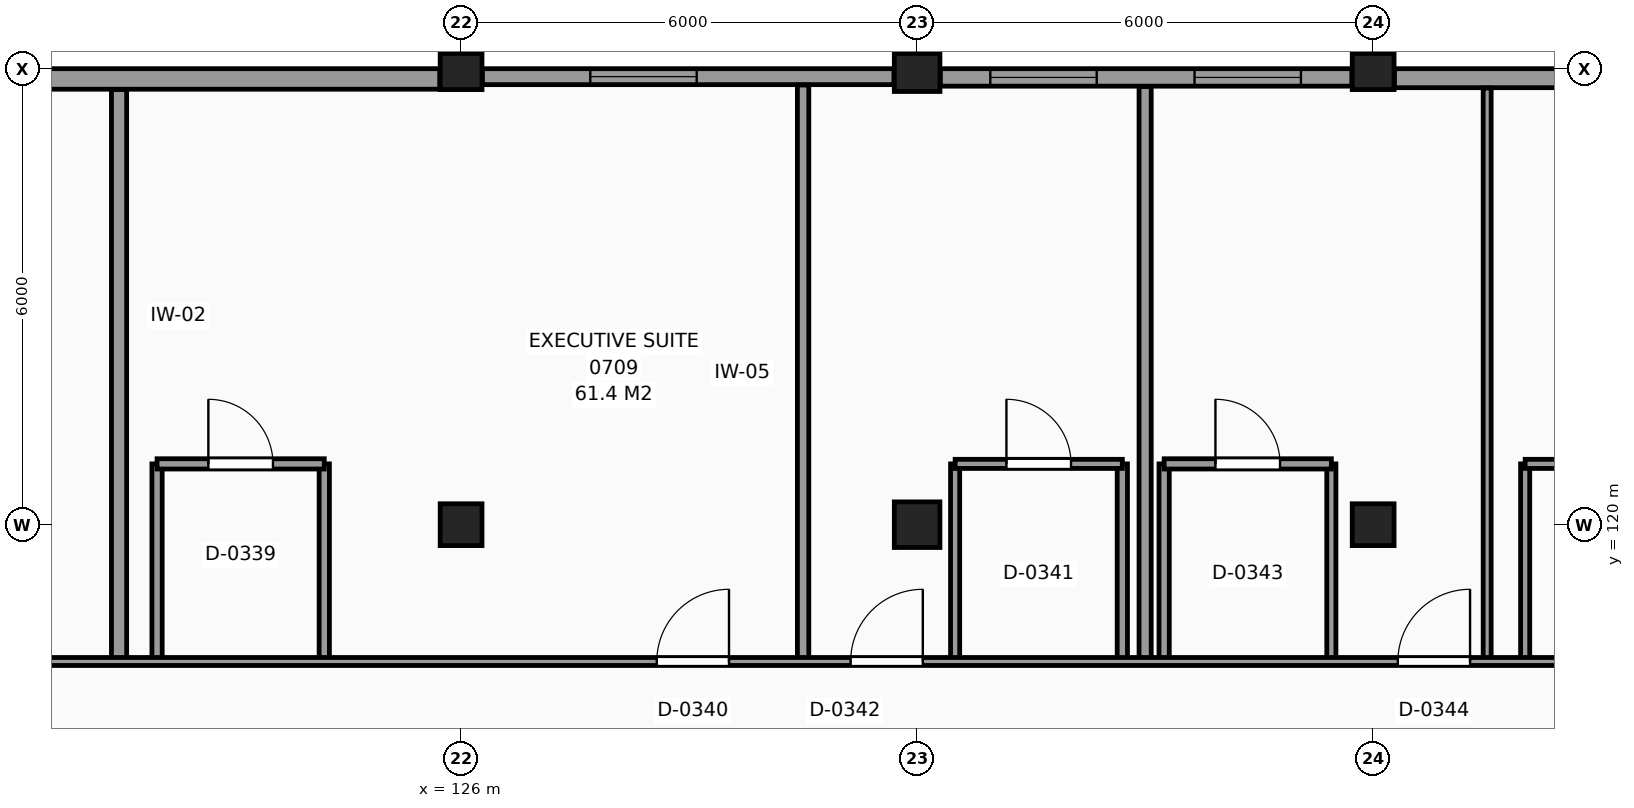
"""IFC4 building model, lengths in metres.
Left out: names, types, materials, properties, quantities, classifications, styles, units other than length and angle.
Written with IfcOpenShell. Run it as: python <this file> out.ifc"""

import sys

from ifc_helpers import new_model, si_unit, direction, frame, frame_2d, origin, origin_2d, place, context, subcontext, project, spatial, rectangle, extrude, element, fill, save


model = new_model("IFC4")
c1 = context("Model", 3, precision=1e-05, world=origin(), true_north=direction((0.0, 1.0)))
c2 = subcontext(c1, "Body", "Model", "MODEL_VIEW")
j1 = project(units=[si_unit("LENGTHUNIT", "METRE"), si_unit("PLANEANGLEUNIT", "RADIAN")], contexts=[c1])
p1 = place(None, origin())
s1 = spatial("IfcSite", under=j1, at=p1, CompositionType="ELEMENT")
p2 = place(p1, origin())
s2 = spatial("IfcBuilding", under=s1, at=p2, CompositionType="ELEMENT")
p3 = place(p2, frame((0.0, 0.0, 31.5)))
s3 = spatial("IfcBuildingStorey", under=s2, at=p3, CompositionType="ELEMENT", Elevation=31.5)
for number, where, z_axis, x_axis in (
    (1, (126.0, 120.0, 0.0), (0.0, 0.0, 1.0), (1.0, 0.0, 0.0)),
    (2, (126.0, 126.0, 0.0), (0.0, 0.0, 1.0), (1.0, 0.0, 0.0)),
):
    element("IfcColumn", number, at=place(p3, frame(where, z_axis=z_axis, x_axis=x_axis)), inside=s3, PredefinedType="COLUMN", context=c2, shape_type="SweptSolid", body=[
        extrude(rectangle(XDim=0.55, YDim=0.55, at=origin_2d()), origin(), (0.0, 0.0, 1.0), 3.3),
    ])
for number, where, z_axis, x_axis in (
    (3, (132.0, 120.0, 0.0), (0.0, 0.0, 1.0), (1.0, 0.0, 0.0)),
    (4, (132.0, 126.0, 0.0), (0.0, 0.0, 1.0), (1.0, 0.0, 0.0)),
):
    element("IfcColumn", number, at=place(p3, frame(where, z_axis=z_axis, x_axis=x_axis)), inside=s3, PredefinedType="COLUMN", context=c2, shape_type="SweptSolid", body=[
        extrude(rectangle(XDim=0.6, YDim=0.6, at=origin_2d()), origin(), (0.0, 0.0, 1.0), 3.3),
    ])
for number, where, z_axis, x_axis in (
    (5, (138.0, 120.0, 0.0), (0.0, 0.0, 1.0), (1.0, 0.0, 0.0)),
    (6, (138.0, 126.0, 0.0), (0.0, 0.0, 1.0), (1.0, 0.0, 0.0)),
):
    element("IfcColumn", number, at=place(p3, frame(where, z_axis=z_axis, x_axis=x_axis)), inside=s3, PredefinedType="COLUMN", context=c2, shape_type="SweptSolid", body=[
        extrude(rectangle(XDim=0.55, YDim=0.55, at=origin_2d()), origin(), (0.0, 0.0, 1.0), 3.3),
    ])
p4 = place(p3, frame((143.695, 125.875, 0.0), z_axis=(0.0, 0.0, 1.0), x_axis=(-1.0, 0.0, 0.0)))
e7 = element("IfcWall", 7, at=p4, inside=s3, PredefinedType="SOLIDWALL", context=c2, shape_type="SweptSolid", body=[
    extrude(rectangle(XDim=5.415, YDim=0.25, at=frame_2d((2.708, 0.0))), origin(), (0.0, 0.0, 1.0), 2.42),
])
p5 = place(p4, frame((1.408, 0.0, 0.8)))
e8 = element("IfcOpeningElement", 8, at=p5, cuts=e7, PredefinedType="OPENING", context=c2, shape_type="SweptSolid", body=[
    extrude(rectangle(XDim=1.4, YDim=1.4, at=frame_2d((0.7, 0.7))), frame((0.0, 0.135, 0.0), z_axis=(0.0, -1.0, 0.0), x_axis=(1.0, 0.0, 0.0)), (0.0, 0.0, 1.0), 0.27),
])
p6 = place(p3, frame((137.72, 125.885, 0.0), z_axis=(0.0, 0.0, 1.0), x_axis=(-1.0, 0.0, 0.0)))
e9 = element("IfcWall", 9, at=p6, inside=s3, PredefinedType="SOLIDWALL", context=c2, shape_type="SweptSolid", body=[
    extrude(rectangle(XDim=5.415, YDim=0.23, at=frame_2d((2.708, 0.0))), origin(), (0.0, 0.0, 1.0), 2.42),
])
p7 = place(p6, frame((3.357, 0.0, 0.8)))
e10 = element("IfcOpeningElement", 10, at=p7, cuts=e9, PredefinedType="OPENING", context=c2, shape_type="SweptSolid", body=[
    extrude(rectangle(XDim=1.4, YDim=1.4, at=frame_2d((0.7, 0.7))), frame((0.0, 0.125, 0.0), z_axis=(0.0, -1.0, 0.0), x_axis=(1.0, 0.0, 0.0)), (0.0, 0.0, 1.0), 0.25),
])
p8 = place(p6, frame((0.67, 0.0, 0.8)))
e11 = element("IfcOpeningElement", 11, at=p8, cuts=e9, PredefinedType="OPENING", context=c2, shape_type="SweptSolid", body=[
    extrude(rectangle(XDim=1.4, YDim=1.4, at=frame_2d((0.7, 0.7))), frame((0.0, 0.125, 0.0), z_axis=(0.0, -1.0, 0.0), x_axis=(1.0, 0.0, 0.0)), (0.0, 0.0, 1.0), 0.25),
])
p9 = place(p3, frame((131.695, 125.895, 0.0), z_axis=(0.0, 0.0, 1.0), x_axis=(-1.0, 0.0, 0.0)))
e12 = element("IfcWall", 12, at=p9, inside=s3, PredefinedType="SOLIDWALL", context=c2, shape_type="SweptSolid", body=[
    extrude(rectangle(XDim=5.415, YDim=0.21, at=frame_2d((2.708, 0.0))), origin(), (0.0, 0.0, 1.0), 2.42),
])
p10 = place(p9, frame((2.595, 0.0, 0.8)))
e13 = element("IfcOpeningElement", 13, at=p10, cuts=e12, PredefinedType="OPENING", context=c2, shape_type="SweptSolid", body=[
    extrude(rectangle(XDim=1.4, YDim=1.4, at=frame_2d((0.7, 0.7))), frame((0.0, 0.115, 0.0), z_axis=(0.0, -1.0, 0.0), x_axis=(1.0, 0.0, 0.0)), (0.0, 0.0, 1.0), 0.23),
])
p11 = place(p3, frame((125.72, 125.865, 0.0), z_axis=(0.0, 0.0, 1.0), x_axis=(-1.0, 0.0, 0.0)))
e14 = element("IfcWall", 14, at=p11, inside=s3, PredefinedType="SOLIDWALL", context=c2, shape_type="SweptSolid", body=[
    extrude(rectangle(XDim=5.415, YDim=0.27, at=frame_2d((2.708, 0.0))), origin(), (0.0, 0.0, 1.0), 2.42),
])
p12 = place(p3, frame((121.5, 118.2, 0.0), z_axis=(0.0, 0.0, 1.0), x_axis=(0.0, 1.0, 0.0)))
e15 = element("IfcWall", 15, at=p12, inside=s3, PredefinedType="PARTITIONING", context=c2, shape_type="SweptSolid", body=[
    extrude(rectangle(XDim=7.525, YDim=0.2, at=frame_2d((3.763, 0.0))), origin(), (0.0, 0.0, 1.0), 3.07),
])
for number, where, z_axis, x_axis in (
    (16, (122.0, 118.2, 0.0), (0.0, 0.0, 1.0), (0.0, 1.0, 0.0)),
    (17, (124.2, 118.2, 0.0), (0.0, 0.0, 1.0), (0.0, 1.0, 0.0)),
):
    element("IfcWall", number, at=place(p3, frame(where, z_axis=z_axis, x_axis=x_axis)), inside=s3, PredefinedType="PARTITIONING", context=c2, shape_type="SweptSolid", body=[
        extrude(rectangle(XDim=2.6, YDim=0.135, at=frame_2d((1.3, 0.0))), origin(), (0.0, 0.0, 1.0), 3.07),
    ])
p13 = place(p3, frame((130.5, 118.2, 0.0), z_axis=(0.0, 0.0, 1.0), x_axis=(0.0, 1.0, 0.0)))
e18 = element("IfcWall", 18, at=p13, inside=s3, PredefinedType="PARTITIONING", context=c2, shape_type="SweptSolid", body=[
    extrude(rectangle(XDim=7.585, YDim=0.15, at=frame_2d((3.792, 0.0))), origin(), (0.0, 0.0, 1.0), 3.07),
])
p14 = place(p3, frame((132.5, 118.2, 0.0), z_axis=(0.0, 0.0, 1.0), x_axis=(0.0, 1.0, 0.0)))
e19 = element("IfcWall", 19, at=p14, inside=s3, PredefinedType="PARTITIONING", context=c2, shape_type="SweptSolid", body=[
    extrude(rectangle(XDim=2.6, YDim=0.12, at=frame_2d((1.3, 0.0))), origin(), (0.0, 0.0, 1.0), 3.07),
])
p15 = place(p3, frame((134.7, 118.2, 0.0), z_axis=(0.0, 0.0, 1.0), x_axis=(0.0, 1.0, 0.0)))
e20 = element("IfcWall", 20, at=p15, inside=s3, PredefinedType="PARTITIONING", context=c2, shape_type="SweptSolid", body=[
    extrude(rectangle(XDim=2.6, YDim=0.135, at=frame_2d((1.3, 0.0))), origin(), (0.0, 0.0, 1.0), 3.07),
])
p16 = place(p3, frame((135.0, 118.2, 0.0), z_axis=(0.0, 0.0, 1.0), x_axis=(0.0, 1.0, 0.0)))
e21 = element("IfcWall", 21, at=p16, inside=s3, PredefinedType="PARTITIONING", context=c2, shape_type="SweptSolid", body=[
    extrude(rectangle(XDim=7.565, YDim=0.16, at=frame_2d((3.782, 0.0))), origin(), (0.0, 0.0, 1.0), 3.07),
])
p17 = place(p3, frame((135.25, 118.2, 0.0), z_axis=(0.0, 0.0, 1.0), x_axis=(0.0, 1.0, 0.0)))
e22 = element("IfcWall", 22, at=p17, inside=s3, PredefinedType="PARTITIONING", context=c2, shape_type="SweptSolid", body=[
    extrude(rectangle(XDim=2.6, YDim=0.135, at=frame_2d((1.3, 0.0))), origin(), (0.0, 0.0, 1.0), 3.07),
])
p18 = place(p3, frame((137.45, 118.2, 0.0), z_axis=(0.0, 0.0, 1.0), x_axis=(0.0, 1.0, 0.0)))
e23 = element("IfcWall", 23, at=p18, inside=s3, PredefinedType="PARTITIONING", context=c2, shape_type="SweptSolid", body=[
    extrude(rectangle(XDim=2.6, YDim=0.12, at=frame_2d((1.3, 0.0))), origin(), (0.0, 0.0, 1.0), 3.07),
])
p19 = place(p3, frame((139.5, 118.2, 0.0), z_axis=(0.0, 0.0, 1.0), x_axis=(0.0, 1.0, 0.0)))
e24 = element("IfcWall", 24, at=p19, inside=s3, PredefinedType="PARTITIONING", context=c2, shape_type="SweptSolid", body=[
    extrude(rectangle(XDim=7.545, YDim=0.105, at=frame_2d((3.772, 0.0))), origin(), (0.0, 0.0, 1.0), 3.07),
])
p20 = place(p3, frame((140.0, 118.2, 0.0), z_axis=(0.0, 0.0, 1.0), x_axis=(0.0, 1.0, 0.0)))
e25 = element("IfcWall", 25, at=p20, inside=s3, PredefinedType="PARTITIONING", context=c2, shape_type="SweptSolid", body=[
    extrude(rectangle(XDim=2.6, YDim=0.12, at=frame_2d((1.3, 0.0))), origin(), (0.0, 0.0, 1.0), 3.07),
])
p21 = place(p3, frame((66.215, 118.2, 0.0), z_axis=(0.0, 0.0, 1.0), x_axis=(1.0, 0.0, 0.0)))
e26 = element("IfcWall", 26, at=p21, inside=s3, PredefinedType="PARTITIONING", context=c2, shape_type="SweptSolid", body=[
    extrude(rectangle(XDim=110.285, YDim=0.105, at=frame_2d((55.143, 0.0))), origin(), (0.0, 0.0, 1.0), 3.07),
])
p22 = place(p21, frame((8.36, 0.0, 0.0)))
e27 = element("IfcOpeningElement", 27, at=p22, cuts=e26, PredefinedType="OPENING", context=c2, shape_type="SweptSolid", body=[
    extrude(rectangle(XDim=0.95, YDim=2.1, at=frame_2d((0.475, 1.05))), frame((0.0, 0.062, 0.0), z_axis=(0.0, -1.0, 0.0), x_axis=(1.0, 0.0, 0.0)), (0.0, 0.0, 1.0), 0.125),
])
p23 = place(p21, frame((12.51, 0.0, 0.0)))
e28 = element("IfcOpeningElement", 28, at=p23, cuts=e26, PredefinedType="OPENING", context=c2, shape_type="SweptSolid", body=[
    extrude(rectangle(XDim=0.95, YDim=2.1, at=frame_2d((0.475, 1.05))), frame((0.0, 0.062, 0.0), z_axis=(0.0, -1.0, 0.0), x_axis=(1.0, 0.0, 0.0)), (0.0, 0.0, 1.0), 0.125),
])
p24 = place(p21, frame((16.91, 0.0, 0.0)))
e29 = element("IfcOpeningElement", 29, at=p24, cuts=e26, PredefinedType="OPENING", context=c2, shape_type="SweptSolid", body=[
    extrude(rectangle(XDim=0.95, YDim=2.1, at=frame_2d((0.475, 1.05))), frame((0.0, 0.062, 0.0), z_axis=(0.0, -1.0, 0.0), x_axis=(1.0, 0.0, 0.0)), (0.0, 0.0, 1.0), 0.125),
])
p25 = place(p21, frame((21.41, 0.0, 0.0)))
e30 = element("IfcOpeningElement", 30, at=p25, cuts=e26, PredefinedType="OPENING", context=c2, shape_type="SweptSolid", body=[
    extrude(rectangle(XDim=0.95, YDim=2.1, at=frame_2d((0.475, 1.05))), frame((0.0, 0.062, 0.0), z_axis=(0.0, -1.0, 0.0), x_axis=(1.0, 0.0, 0.0)), (0.0, 0.0, 1.0), 0.125),
])
p26 = place(p21, frame((30.51, 0.0, 0.0)))
e31 = element("IfcOpeningElement", 31, at=p26, cuts=e26, PredefinedType="OPENING", context=c2, shape_type="SweptSolid", body=[
    extrude(rectangle(XDim=0.95, YDim=2.1, at=frame_2d((0.475, 1.05))), frame((0.0, 0.062, 0.0), z_axis=(0.0, -1.0, 0.0), x_axis=(1.0, 0.0, 0.0)), (0.0, 0.0, 1.0), 0.125),
])
p27 = place(p21, frame((34.91, 0.0, 0.0)))
e32 = element("IfcOpeningElement", 32, at=p27, cuts=e26, PredefinedType="OPENING", context=c2, shape_type="SweptSolid", body=[
    extrude(rectangle(XDim=0.95, YDim=2.1, at=frame_2d((0.475, 1.05))), frame((0.0, 0.062, 0.0), z_axis=(0.0, -1.0, 0.0), x_axis=(1.0, 0.0, 0.0)), (0.0, 0.0, 1.0), 0.125),
])
p28 = place(p21, frame((42.11, 0.0, 0.0)))
e33 = element("IfcOpeningElement", 33, at=p28, cuts=e26, PredefinedType="OPENING", context=c2, shape_type="SweptSolid", body=[
    extrude(rectangle(XDim=0.95, YDim=2.1, at=frame_2d((0.475, 1.05))), frame((0.0, 0.062, 0.0), z_axis=(0.0, -1.0, 0.0), x_axis=(1.0, 0.0, 0.0)), (0.0, 0.0, 1.0), 0.125),
])
p29 = place(p21, frame((50.36, 0.0, 0.0)))
e34 = element("IfcOpeningElement", 34, at=p29, cuts=e26, PredefinedType="OPENING", context=c2, shape_type="SweptSolid", body=[
    extrude(rectangle(XDim=0.95, YDim=2.1, at=frame_2d((0.475, 1.05))), frame((0.0, 0.062, 0.0), z_axis=(0.0, -1.0, 0.0), x_axis=(1.0, 0.0, 0.0)), (0.0, 0.0, 1.0), 0.125),
])
p30 = place(p21, frame((62.36, 0.0, 0.0)))
e35 = element("IfcOpeningElement", 35, at=p30, cuts=e26, PredefinedType="OPENING", context=c2, shape_type="SweptSolid", body=[
    extrude(rectangle(XDim=0.95, YDim=2.1, at=frame_2d((0.475, 1.05))), frame((0.0, 0.062, 0.0), z_axis=(0.0, -1.0, 0.0), x_axis=(1.0, 0.0, 0.0)), (0.0, 0.0, 1.0), 0.125),
])
p31 = place(p21, frame((64.91, 0.0, 0.0)))
e36 = element("IfcOpeningElement", 36, at=p31, cuts=e26, PredefinedType="OPENING", context=c2, shape_type="SweptSolid", body=[
    extrude(rectangle(XDim=0.95, YDim=2.1, at=frame_2d((0.475, 1.05))), frame((0.0, 0.062, 0.0), z_axis=(0.0, -1.0, 0.0), x_axis=(1.0, 0.0, 0.0)), (0.0, 0.0, 1.0), 0.125),
])
p32 = place(p21, frame((72.11, 0.0, 0.0)))
e37 = element("IfcOpeningElement", 37, at=p32, cuts=e26, PredefinedType="OPENING", context=c2, shape_type="SweptSolid", body=[
    extrude(rectangle(XDim=0.95, YDim=2.1, at=frame_2d((0.475, 1.05))), frame((0.0, 0.062, 0.0), z_axis=(0.0, -1.0, 0.0), x_axis=(1.0, 0.0, 0.0)), (0.0, 0.0, 1.0), 0.125),
])
p33 = place(p21, frame((76.31, 0.0, 0.0)))
e38 = element("IfcOpeningElement", 38, at=p33, cuts=e26, PredefinedType="OPENING", context=c2, shape_type="SweptSolid", body=[
    extrude(rectangle(XDim=0.95, YDim=2.1, at=frame_2d((0.475, 1.05))), frame((0.0, 0.062, 0.0), z_axis=(0.0, -1.0, 0.0), x_axis=(1.0, 0.0, 0.0)), (0.0, 0.0, 1.0), 0.125),
])
p34 = place(p21, frame((78.51, 0.0, 0.0)))
e39 = element("IfcOpeningElement", 39, at=p34, cuts=e26, PredefinedType="OPENING", context=c2, shape_type="SweptSolid", body=[
    extrude(rectangle(XDim=0.95, YDim=2.1, at=frame_2d((0.475, 1.05))), frame((0.0, 0.062, 0.0), z_axis=(0.0, -1.0, 0.0), x_axis=(1.0, 0.0, 0.0)), (0.0, 0.0, 1.0), 0.125),
])
p35 = place(p21, frame((84.51, 0.0, 0.0)))
e40 = element("IfcOpeningElement", 40, at=p35, cuts=e26, PredefinedType="OPENING", context=c2, shape_type="SweptSolid", body=[
    extrude(rectangle(XDim=0.95, YDim=2.1, at=frame_2d((0.475, 1.05))), frame((0.0, 0.062, 0.0), z_axis=(0.0, -1.0, 0.0), x_axis=(1.0, 0.0, 0.0)), (0.0, 0.0, 1.0), 0.125),
])
p36 = place(p21, frame((98.36, 0.0, 0.0)))
e41 = element("IfcOpeningElement", 41, at=p36, cuts=e26, PredefinedType="OPENING", context=c2, shape_type="SweptSolid", body=[
    extrude(rectangle(XDim=0.95, YDim=2.1, at=frame_2d((0.475, 1.05))), frame((0.0, 0.062, 0.0), z_axis=(0.0, -1.0, 0.0), x_axis=(1.0, 0.0, 0.0)), (0.0, 0.0, 1.0), 0.125),
])
p37 = place(p21, frame((104.26, 0.0, 0.0)))
e42 = element("IfcOpeningElement", 42, at=p37, cuts=e26, PredefinedType="OPENING", context=c2, shape_type="SweptSolid", body=[
    extrude(rectangle(XDim=0.95, YDim=2.1, at=frame_2d((0.475, 1.05))), frame((0.0, 0.062, 0.0), z_axis=(0.0, -1.0, 0.0), x_axis=(1.0, 0.0, 0.0)), (0.0, 0.0, 1.0), 0.125),
])
p38 = place(p3, frame((122.0, 120.8, 0.0), z_axis=(0.0, 0.0, 1.0), x_axis=(1.0, 0.0, 0.0)))
e43 = element("IfcWall", 43, at=p38, inside=s3, PredefinedType="PARTITIONING", context=c2, shape_type="SweptSolid", body=[
    extrude(rectangle(XDim=2.2, YDim=0.135, at=frame_2d((1.1, 0.0))), origin(), (0.0, 0.0, 1.0), 3.07),
])
p39 = place(p38, frame((0.675, 0.0, 0.0)))
e44 = element("IfcOpeningElement", 44, at=p39, cuts=e43, PredefinedType="OPENING", context=c2, shape_type="SweptSolid", body=[
    extrude(rectangle(XDim=0.85, YDim=2.1, at=frame_2d((0.425, 1.05))), frame((0.0, 0.078, 0.0), z_axis=(0.0, -1.0, 0.0), x_axis=(1.0, 0.0, 0.0)), (0.0, 0.0, 1.0), 0.155),
])
p40 = place(p3, frame((132.5, 120.8, 0.0), z_axis=(0.0, 0.0, 1.0), x_axis=(1.0, 0.0, 0.0)))
e45 = element("IfcWall", 45, at=p40, inside=s3, PredefinedType="PARTITIONING", context=c2, shape_type="SweptSolid", body=[
    extrude(rectangle(XDim=2.2, YDim=0.12, at=frame_2d((1.1, 0.0))), origin(), (0.0, 0.0, 1.0), 3.07),
])
p41 = place(p40, frame((0.675, 0.0, 0.0)))
e46 = element("IfcOpeningElement", 46, at=p41, cuts=e45, PredefinedType="OPENING", context=c2, shape_type="SweptSolid", body=[
    extrude(rectangle(XDim=0.85, YDim=2.1, at=frame_2d((0.425, 1.05))), frame((0.0, 0.07, 0.0), z_axis=(0.0, -1.0, 0.0), x_axis=(1.0, 0.0, 0.0)), (0.0, 0.0, 1.0), 0.14),
])
p42 = place(p3, frame((135.25, 120.8, 0.0), z_axis=(0.0, 0.0, 1.0), x_axis=(1.0, 0.0, 0.0)))
e47 = element("IfcWall", 47, at=p42, inside=s3, PredefinedType="PARTITIONING", context=c2, shape_type="SweptSolid", body=[
    extrude(rectangle(XDim=2.2, YDim=0.135, at=frame_2d((1.1, 0.0))), origin(), (0.0, 0.0, 1.0), 3.07),
])
p43 = place(p42, frame((0.675, 0.0, 0.0)))
e48 = element("IfcOpeningElement", 48, at=p43, cuts=e47, PredefinedType="OPENING", context=c2, shape_type="SweptSolid", body=[
    extrude(rectangle(XDim=0.85, YDim=2.1, at=frame_2d((0.425, 1.05))), frame((0.0, 0.078, 0.0), z_axis=(0.0, -1.0, 0.0), x_axis=(1.0, 0.0, 0.0)), (0.0, 0.0, 1.0), 0.155),
])
p44 = place(p3, frame((140.0, 120.8, 0.0), z_axis=(0.0, 0.0, 1.0), x_axis=(1.0, 0.0, 0.0)))
e49 = element("IfcWall", 49, at=p44, inside=s3, PredefinedType="PARTITIONING", context=c2, shape_type="SweptSolid", body=[
    extrude(rectangle(XDim=2.2, YDim=0.12, at=frame_2d((1.1, 0.0))), origin(), (0.0, 0.0, 1.0), 3.07),
])
p45 = place(p44, frame((0.675, 0.0, 0.0)))
e50 = element("IfcOpeningElement", 50, at=p45, cuts=e49, PredefinedType="OPENING", context=c2, shape_type="SweptSolid", body=[
    extrude(rectangle(XDim=0.85, YDim=2.1, at=frame_2d((0.425, 1.05))), frame((0.0, 0.07, 0.0), z_axis=(0.0, -1.0, 0.0), x_axis=(1.0, 0.0, 0.0)), (0.0, 0.0, 1.0), 0.14),
])
p46 = place(p10, origin())
e51 = element("IfcWindow", 51, at=p46, inside=s3, PartitioningType="SINGLE_PANEL", PredefinedType="WINDOW", context=c2, shape_type="SweptSolid", body=[
    extrude(rectangle(XDim=1.4, YDim=1.4, at=frame_2d((0.7, 0.7))), frame((0.0, 0.03, 0.0), z_axis=(0.0, -1.0, 0.0), x_axis=(1.0, 0.0, 0.0)), (0.0, 0.0, 1.0), 0.06),
])
fill(e13, e51)
p47 = place(p7, origin())
e52 = element("IfcWindow", 52, at=p47, inside=s3, PartitioningType="SINGLE_PANEL", PredefinedType="WINDOW", context=c2, shape_type="SweptSolid", body=[
    extrude(rectangle(XDim=1.4, YDim=1.4, at=frame_2d((0.7, 0.7))), frame((0.0, 0.03, 0.0), z_axis=(0.0, -1.0, 0.0), x_axis=(1.0, 0.0, 0.0)), (0.0, 0.0, 1.0), 0.06),
])
fill(e10, e52)
p48 = place(p8, origin())
e53 = element("IfcWindow", 53, at=p48, inside=s3, PartitioningType="SINGLE_PANEL", PredefinedType="WINDOW", context=c2, shape_type="SweptSolid", body=[
    extrude(rectangle(XDim=1.4, YDim=1.4, at=frame_2d((0.7, 0.7))), frame((0.0, 0.03, 0.0), z_axis=(0.0, -1.0, 0.0), x_axis=(1.0, 0.0, 0.0)), (0.0, 0.0, 1.0), 0.06),
])
fill(e11, e53)
p49 = place(p39, origin())
e54 = element("IfcDoor", 54, at=p49, inside=s3, OperationType="SINGLE_SWING_LEFT", PredefinedType="DOOR", context=c2, shape_type="SweptSolid", body=[
    extrude(rectangle(XDim=0.85, YDim=2.1, at=frame_2d((0.425, 1.05))), frame((0.0, 0.025, 0.0), z_axis=(0.0, -1.0, 0.0), x_axis=(1.0, 0.0, 0.0)), (0.0, 0.0, 1.0), 0.05),
])
fill(e44, e54)
p50 = place(p30, origin())
e55 = element("IfcDoor", 55, at=p50, inside=s3, OperationType="SINGLE_SWING_RIGHT", PredefinedType="DOOR", context=c2, shape_type="SweptSolid", body=[
    extrude(rectangle(XDim=0.95, YDim=2.1, at=frame_2d((0.475, 1.05))), frame((0.0, 0.025, 0.0), z_axis=(0.0, -1.0, 0.0), x_axis=(1.0, 0.0, 0.0)), (0.0, 0.0, 1.0), 0.05),
])
fill(e35, e55)
p51 = place(p41, origin())
e56 = element("IfcDoor", 56, at=p51, inside=s3, OperationType="SINGLE_SWING_LEFT", PredefinedType="DOOR", context=c2, shape_type="SweptSolid", body=[
    extrude(rectangle(XDim=0.85, YDim=2.1, at=frame_2d((0.425, 1.05))), frame((0.0, 0.025, 0.0), z_axis=(0.0, -1.0, 0.0), x_axis=(1.0, 0.0, 0.0)), (0.0, 0.0, 1.0), 0.05),
])
fill(e46, e56)
p52 = place(p31, origin())
e57 = element("IfcDoor", 57, at=p52, inside=s3, OperationType="SINGLE_SWING_RIGHT", PredefinedType="DOOR", context=c2, shape_type="SweptSolid", body=[
    extrude(rectangle(XDim=0.95, YDim=2.1, at=frame_2d((0.475, 1.05))), frame((0.0, 0.025, 0.0), z_axis=(0.0, -1.0, 0.0), x_axis=(1.0, 0.0, 0.0)), (0.0, 0.0, 1.0), 0.05),
])
fill(e36, e57)
p53 = place(p43, origin())
e58 = element("IfcDoor", 58, at=p53, inside=s3, OperationType="SINGLE_SWING_LEFT", PredefinedType="DOOR", context=c2, shape_type="SweptSolid", body=[
    extrude(rectangle(XDim=0.85, YDim=2.1, at=frame_2d((0.425, 1.05))), frame((0.0, 0.025, 0.0), z_axis=(0.0, -1.0, 0.0), x_axis=(1.0, 0.0, 0.0)), (0.0, 0.0, 1.0), 0.05),
])
fill(e48, e58)
p54 = place(p32, origin())
e59 = element("IfcDoor", 59, at=p54, inside=s3, OperationType="SINGLE_SWING_RIGHT", PredefinedType="DOOR", context=c2, shape_type="SweptSolid", body=[
    extrude(rectangle(XDim=0.95, YDim=2.1, at=frame_2d((0.475, 1.05))), frame((0.0, 0.025, 0.0), z_axis=(0.0, -1.0, 0.0), x_axis=(1.0, 0.0, 0.0)), (0.0, 0.0, 1.0), 0.05),
])
fill(e37, e59)
save(model, sys.argv[1])
